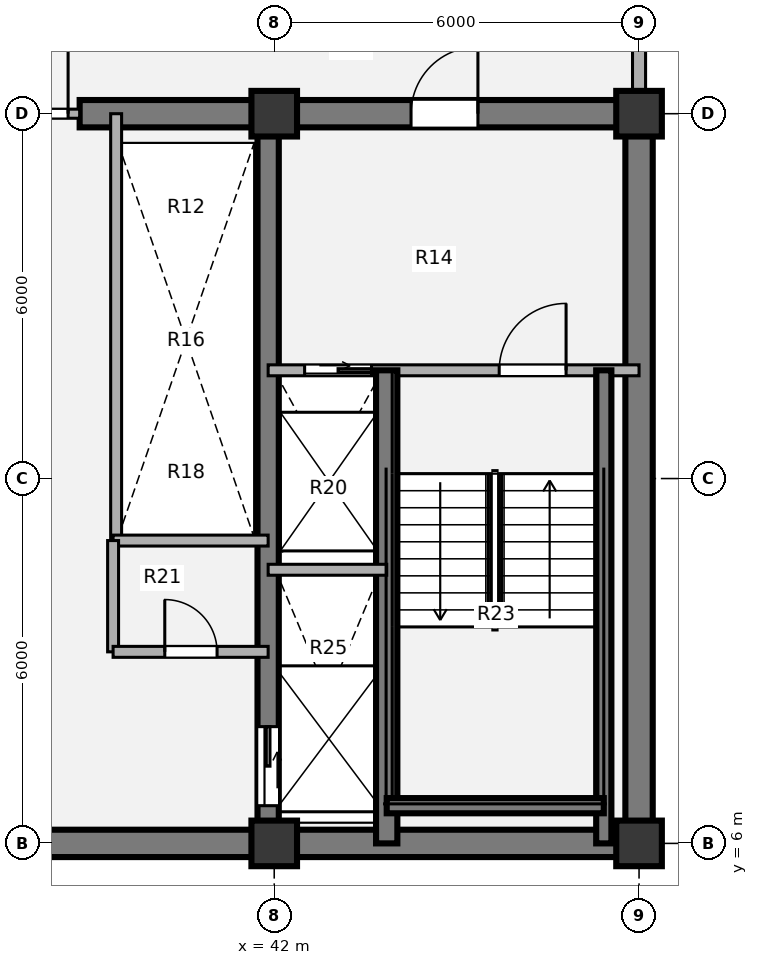
"""IFC4 building model, lengths in metres.
Left out: names, types, materials, properties, quantities, classifications, styles, units other than length and angle.
Written with IfcOpenShell. Run it as: python <this file> out.ifc"""

import sys

from ifc_helpers import new_model, si_unit, direction, frame, frame_2d, origin, origin_2d, place, context, subcontext, project, spatial, rectangle, extrude, source, transform, mapped, element, fill, save


model = new_model("IFC4")
c1 = context("Model", 3, precision=1e-05, world=origin(), true_north=direction((0.0, 1.0)))
c2 = subcontext(c1, "Body", "Model", "MODEL_VIEW")
j1 = project(units=[si_unit("LENGTHUNIT", "METRE"), si_unit("PLANEANGLEUNIT", "RADIAN")], contexts=[c1])
p1 = place(None, origin())
s1 = spatial("IfcSite", under=j1, at=p1, CompositionType="ELEMENT")
p2 = place(p1, origin())
s2 = spatial("IfcBuilding", under=s1, at=p2, CompositionType="ELEMENT")
p3 = place(p2, frame((0.0, 0.0, 190.44)))
s3 = spatial("IfcBuildingStorey", under=s2, at=p3, CompositionType="ELEMENT", Elevation=190.44)
m1 = source(origin(), c2, "Body", "SweptSolid", [
    extrude(rectangle(XDim=0.75, YDim=0.75, at=origin_2d()), origin(), (0.0, 0.0, 1.0), 3.78),
])
for number, where, z_axis, x_axis in (
    (1, (42.0, 6.0, 0.0), (0.0, 0.0, 1.0), (1.0, 0.0, 0.0)),
    (2, (48.0, 6.0, 0.0), (0.0, 0.0, 1.0), (1.0, 0.0, 0.0)),
    (3, (42.0, 18.0, 0.0), (0.0, 0.0, 1.0), (1.0, 0.0, 0.0)),
    (4, (48.0, 18.0, 0.0), (0.0, 0.0, 1.0), (1.0, 0.0, 0.0)),
):
    element("IfcColumn", number, at=place(p3, frame(where, z_axis=z_axis, x_axis=x_axis)), inside=s3, PredefinedType="COLUMN", context=c2, shape_type="MappedRepresentation", body=[
        mapped(m1, transform((0.0, 0.0, 0.0), x_axis=(1.0, 0.0, 0.0), y_axis=(0.0, 1.0, 0.0), z_axis=(0.0, 0.0, 1.0), scale=1.0)),
    ])
p4 = place(p3, frame((48.225, 6.0, 0.0), z_axis=(0.0, 0.0, 1.0), x_axis=(-1.0, 0.0, 0.0)))
e5 = element("IfcWall", 5, at=p4, inside=s3, PredefinedType="SHEAR", context=c2, shape_type="SweptSolid", body=[
    extrude(rectangle(XDim=24.45, YDim=0.45, at=frame_2d((12.225, 0.0))), origin(), (0.0, 0.0, 1.0), 3.78),
])
p5 = place(p3, frame((48.0, 18.0, 0.0), z_axis=(0.0, 0.0, 1.0), x_axis=(0.0, -1.0, 0.0)))
e6 = element("IfcWall", 6, at=p5, inside=s3, PredefinedType="SHEAR", context=c2, shape_type="SweptSolid", body=[
    extrude(rectangle(XDim=12.0, YDim=0.45, at=frame_2d((6.0, 0.0))), origin(), (0.0, 0.0, 1.0), 3.78),
])
p6 = place(p3, frame((38.8, 18.0, 0.0), z_axis=(0.0, 0.0, 1.0), x_axis=(1.0, 0.0, 0.0)))
e7 = element("IfcWall", 7, at=p6, inside=s3, PredefinedType="SHEAR", context=c2, shape_type="SweptSolid", body=[
    extrude(rectangle(XDim=9.425, YDim=0.45, at=frame_2d((4.712, 0.0))), origin(), (0.0, 0.0, 1.0), 3.78),
])
p7 = place(p6, frame((5.45, 0.0, 0.0)))
e8 = element("IfcOpeningElement", 8, at=p7, cuts=e7, PredefinedType="OPENING", context=c2, shape_type="SweptSolid", body=[
    extrude(rectangle(XDim=1.1, YDim=2.1, at=origin_2d()), frame((0.55, 0.235, 1.05), z_axis=(0.0, -1.0, 0.0), x_axis=(1.0, 0.0, 0.0)), (0.0, 0.0, 1.0), 0.47),
])
p8 = place(p3, frame((41.9, 18.0, 0.0), z_axis=(0.0, 0.0, 1.0), x_axis=(0.0, -1.0, 0.0)))
e9 = element("IfcWall", 9, at=p8, inside=s3, PredefinedType="SHEAR", context=c2, shape_type="SweptSolid", body=[
    extrude(rectangle(XDim=12.0, YDim=0.35, at=frame_2d((6.0, 0.0))), origin(), (0.0, 0.0, 1.0), 3.78),
])
p9 = place(p8, frame((10.08, 0.0, 0.0)))
e10 = element("IfcOpeningElement", 10, at=p9, cuts=e9, PredefinedType="OPENING", context=c2, shape_type="SweptSolid", body=[
    extrude(rectangle(XDim=1.3, YDim=2.1, at=origin_2d()), frame((0.65, 0.185, 1.05), z_axis=(0.0, -1.0, 0.0), x_axis=(1.0, 0.0, 0.0)), (0.0, 0.0, 1.0), 0.37),
])
p10 = place(p3, frame((48.0, 21.05, 0.0), z_axis=(0.0, 0.0, 1.0), x_axis=(0.0, -1.0, 0.0)))
e11 = element("IfcWall", 11, at=p10, inside=s3, PredefinedType="SOLIDWALL", context=c2, shape_type="SweptSolid", body=[
    extrude(rectangle(XDim=2.695, YDim=0.215, at=frame_2d((1.348, 0.0))), origin(), (0.0, 0.0, 1.0), 2.718),
])
p11 = place(p3, frame((39.4, 11.0, 0.0), z_axis=(0.0, 0.0, 1.0), x_axis=(0.0, 1.0, 0.0)))
e12 = element("IfcWall", 12, at=p11, inside=s3, PredefinedType="PARTITIONING", context=c2, shape_type="SweptSolid", body=[
    extrude(rectangle(XDim=7.0, YDim=0.18, at=frame_2d((3.5, 0.0))), origin(), (0.0, 0.0, 1.0), 3.5),
])
p12 = place(p3, frame((39.35, 10.98, 0.0), z_axis=(0.0, 0.0, 1.0), x_axis=(1.0, 0.0, 0.0)))
e13 = element("IfcWall", 13, at=p12, inside=s3, PredefinedType="PARTITIONING", context=c2, shape_type="SweptSolid", body=[
    extrude(rectangle(XDim=2.55, YDim=0.18, at=frame_2d((1.275, 0.0))), origin(), (0.0, 0.0, 1.0), 3.5),
])
p13 = place(p3, frame((39.35, 9.15, 0.0), z_axis=(0.0, 0.0, 1.0), x_axis=(0.0, 1.0, 0.0)))
e14 = element("IfcWall", 14, at=p13, inside=s3, PredefinedType="PARTITIONING", context=c2, shape_type="SweptSolid", body=[
    extrude(rectangle(XDim=1.83, YDim=0.18, at=frame_2d((0.915, 0.0))), origin(), (0.0, 0.0, 1.0), 3.5),
])
p14 = place(p3, frame((39.35, 9.15, 0.0), z_axis=(0.0, 0.0, 1.0), x_axis=(1.0, 0.0, 0.0)))
e15 = element("IfcWall", 15, at=p14, inside=s3, PredefinedType="PARTITIONING", context=c2, shape_type="SweptSolid", body=[
    extrude(rectangle(XDim=2.55, YDim=0.18, at=frame_2d((1.275, 0.0))), origin(), (0.0, 0.0, 1.0), 3.5),
])
p15 = place(p14, frame((0.85, 0.0, 0.0)))
e16 = element("IfcOpeningElement", 16, at=p15, cuts=e15, PredefinedType="OPENING", context=c2, shape_type="SweptSolid", body=[
    extrude(rectangle(XDim=0.86, YDim=2.1, at=origin_2d()), frame((0.43, 0.1, 1.05), z_axis=(0.0, -1.0, 0.0), x_axis=(1.0, 0.0, 0.0)), (0.0, 0.0, 1.0), 0.2),
])
p16 = place(p3, frame((33.2, 18.0, 0.0), z_axis=(0.0, 0.0, 1.0), x_axis=(1.0, 0.0, 0.0)))
e17 = element("IfcWall", 17, at=p16, inside=s3, PredefinedType="PARTITIONING", context=c2, shape_type="SweptSolid", body=[
    extrude(rectangle(XDim=5.6, YDim=0.15, at=frame_2d((2.8, 0.0))), origin(), (0.0, 0.0, 1.0), 2.515),
])
p17 = place(p16, frame((0.19, 0.0, 0.0)))
e18 = element("IfcOpeningElement", 18, at=p17, cuts=e17, PredefinedType="OPENING", context=c2, shape_type="SweptSolid", body=[
    extrude(rectangle(XDim=1.1, YDim=2.1, at=origin_2d()), frame((0.55, 0.085, 1.05), z_axis=(0.0, -1.0, 0.0), x_axis=(1.0, 0.0, 0.0)), (0.0, 0.0, 1.0), 0.17),
])
p18 = place(p16, frame((4.31, 0.0, 0.0)))
e19 = element("IfcOpeningElement", 19, at=p18, cuts=e17, PredefinedType="OPENING", context=c2, shape_type="SweptSolid", body=[
    extrude(rectangle(XDim=1.1, YDim=2.1, at=origin_2d()), frame((0.55, 0.085, 1.05), z_axis=(0.0, -1.0, 0.0), x_axis=(1.0, 0.0, 0.0)), (0.0, 0.0, 1.0), 0.17),
])
p19 = place(p3, frame((41.9, 13.78, 0.0), z_axis=(0.0, 0.0, 1.0), x_axis=(1.0, 0.0, 0.0)))
e20 = element("IfcWall", 20, at=p19, inside=s3, PredefinedType="PARTITIONING", context=c2, shape_type="SweptSolid", body=[
    extrude(rectangle(XDim=6.1, YDim=0.18, at=frame_2d((3.05, 0.0))), origin(), (0.0, 0.0, 1.0), 3.5),
])
p20 = place(p19, frame((0.6, 0.0, 0.0)))
e21 = element("IfcOpeningElement", 21, at=p20, cuts=e20, PredefinedType="OPENING", context=c2, shape_type="SweptSolid", body=[
    extrude(rectangle(XDim=1.1, YDim=2.1, at=origin_2d()), frame((0.55, 0.1, 1.05), z_axis=(0.0, -1.0, 0.0), x_axis=(1.0, 0.0, 0.0)), (0.0, 0.0, 1.0), 0.2),
])
p21 = place(p19, frame((3.8, 0.0, 0.0)))
e22 = element("IfcOpeningElement", 22, at=p21, cuts=e20, PredefinedType="OPENING", context=c2, shape_type="SweptSolid", body=[
    extrude(rectangle(XDim=1.1, YDim=2.1, at=origin_2d()), frame((0.55, 0.1, 1.05), z_axis=(0.0, -1.0, 0.0), x_axis=(1.0, 0.0, 0.0)), (0.0, 0.0, 1.0), 0.2),
])
p22 = place(p3, frame((43.85, 6.0, 0.0), z_axis=(0.0, 0.0, 1.0), x_axis=(0.0, 1.0, 0.0)))
e23 = element("IfcWall", 23, at=p22, inside=s3, PredefinedType="SHEAR", context=c2, shape_type="SweptSolid", body=[
    extrude(rectangle(XDim=7.78, YDim=0.35, at=frame_2d((3.89, 0.0))), origin(), (0.0, 0.0, 1.0), 3.85),
])
p23 = place(p3, frame((47.42, 6.0, 0.0), z_axis=(0.0, 0.0, 1.0), x_axis=(0.0, 1.0, 0.0)))
e24 = element("IfcWall", 24, at=p23, inside=s3, PredefinedType="SHEAR", context=c2, shape_type="SweptSolid", body=[
    extrude(rectangle(XDim=7.78, YDim=0.25, at=frame_2d((3.89, 0.0))), origin(), (0.0, 0.0, 1.0), 3.85),
])
p24 = place(p3, frame((43.85, 6.62, 0.0), z_axis=(0.0, 0.0, 1.0), x_axis=(1.0, 0.0, 0.0)))
e25 = element("IfcWall", 25, at=p24, inside=s3, PredefinedType="SHEAR", context=c2, shape_type="SweptSolid", body=[
    extrude(rectangle(XDim=3.57, YDim=0.25, at=frame_2d((1.785, 0.0))), origin(), (0.0, 0.0, 1.0), 3.85),
])
p25 = place(p3, frame((41.9, 10.5, 0.0), z_axis=(0.0, 0.0, 1.0), x_axis=(1.0, 0.0, 0.0)))
e26 = element("IfcWall", 26, at=p25, inside=s3, PredefinedType="PARTITIONING", context=c2, shape_type="SweptSolid", body=[
    extrude(rectangle(XDim=1.95, YDim=0.18, at=frame_2d((0.975, 0.0))), origin(), (0.0, 0.0, 1.0), 3.5),
])
m2 = source(origin(), c2, "Body", "SweptSolid", [
    extrude(rectangle(XDim=0.86, YDim=2.1, at=origin_2d()), frame((0.43, 0.025, 1.05), z_axis=(0.0, -1.0, 0.0), x_axis=(1.0, 0.0, 0.0)), (0.0, 0.0, 1.0), 0.05),
])
p26 = place(p15, origin())
e27 = element("IfcDoor", 27, at=p26, inside=s3, OperationType="SINGLE_SWING_LEFT", PredefinedType="DOOR", context=c2, shape_type="MappedRepresentation", body=[
    mapped(m2, transform((0.0, 0.0, 0.0), x_axis=(1.0, 0.0, 0.0), y_axis=(0.0, 1.0, 0.0), z_axis=(0.0, 0.0, 1.0), scale=1.0)),
])
fill(e16, e27)
m3 = source(origin(), c2, "Body", "SweptSolid", [
    extrude(rectangle(XDim=1.1, YDim=2.1, at=origin_2d()), frame((0.55, 0.025, 1.05), z_axis=(0.0, -1.0, 0.0), x_axis=(1.0, 0.0, 0.0)), (0.0, 0.0, 1.0), 0.05),
])
p27 = place(p18, origin())
e28 = element("IfcDoor", 28, at=p27, inside=s3, OperationType="SINGLE_SWING_RIGHT", PredefinedType="DOOR", context=c2, shape_type="MappedRepresentation", body=[
    mapped(m3, transform((0.0, 0.0, 0.0), x_axis=(1.0, 0.0, 0.0), y_axis=(0.0, 1.0, 0.0), z_axis=(0.0, 0.0, 1.0), scale=1.0)),
])
fill(e19, e28)
m4 = source(origin(), c2, "Body", "SweptSolid", [
    extrude(rectangle(XDim=1.1, YDim=2.1, at=origin_2d()), frame((0.55, 0.025, 1.05), z_axis=(0.0, -1.0, 0.0), x_axis=(1.0, 0.0, 0.0)), (0.0, 0.0, 1.0), 0.05),
])
p28 = place(p20, origin())
e29 = element("IfcDoor", 29, at=p28, inside=s3, OperationType="SLIDING_TO_RIGHT", PredefinedType="DOOR", context=c2, shape_type="MappedRepresentation", body=[
    mapped(m4, transform((0.0, 0.0, 0.0), x_axis=(1.0, 0.0, 0.0), y_axis=(0.0, 1.0, 0.0), z_axis=(0.0, 0.0, 1.0), scale=1.0)),
])
fill(e21, e29)
m5 = source(origin(), c2, "Body", "SweptSolid", [
    extrude(rectangle(XDim=1.1, YDim=2.1, at=origin_2d()), frame((0.55, 0.025, 1.05), z_axis=(0.0, -1.0, 0.0), x_axis=(1.0, 0.0, 0.0)), (0.0, 0.0, 1.0), 0.05),
])
p29 = place(p21, origin())
e30 = element("IfcDoor", 30, at=p29, inside=s3, OperationType="SINGLE_SWING_RIGHT", PredefinedType="DOOR", context=c2, shape_type="MappedRepresentation", body=[
    mapped(m5, transform((0.0, 0.0, 0.0), x_axis=(1.0, 0.0, 0.0), y_axis=(0.0, 1.0, 0.0), z_axis=(0.0, 0.0, 1.0), scale=1.0)),
])
fill(e22, e30)
m6 = source(origin(), c2, "Body", "SweptSolid", [
    extrude(rectangle(XDim=1.3, YDim=2.1, at=origin_2d()), frame((0.65, 0.025, 1.05), z_axis=(0.0, -1.0, 0.0), x_axis=(1.0, 0.0, 0.0)), (0.0, 0.0, 1.0), 0.05),
])
p30 = place(p9, origin())
e31 = element("IfcDoor", 31, at=p30, inside=s3, OperationType="SLIDING_TO_LEFT", PredefinedType="DOOR", context=c2, shape_type="MappedRepresentation", body=[
    mapped(m6, transform((0.0, 0.0, 0.0), x_axis=(1.0, 0.0, 0.0), y_axis=(0.0, 1.0, 0.0), z_axis=(0.0, 0.0, 1.0), scale=1.0)),
])
fill(e10, e31)
p31 = place(p7, origin())
e32 = element("IfcDoor", 32, at=p31, inside=s3, OperationType="SINGLE_SWING_RIGHT", PredefinedType="DOOR", context=c2, shape_type="MappedRepresentation", body=[
    mapped(m3, transform((0.0, 0.0, 0.0), x_axis=(1.0, 0.0, 0.0), y_axis=(0.0, 1.0, 0.0), z_axis=(0.0, 0.0, 1.0), scale=1.0)),
])
fill(e8, e32)
save(model, sys.argv[1])
